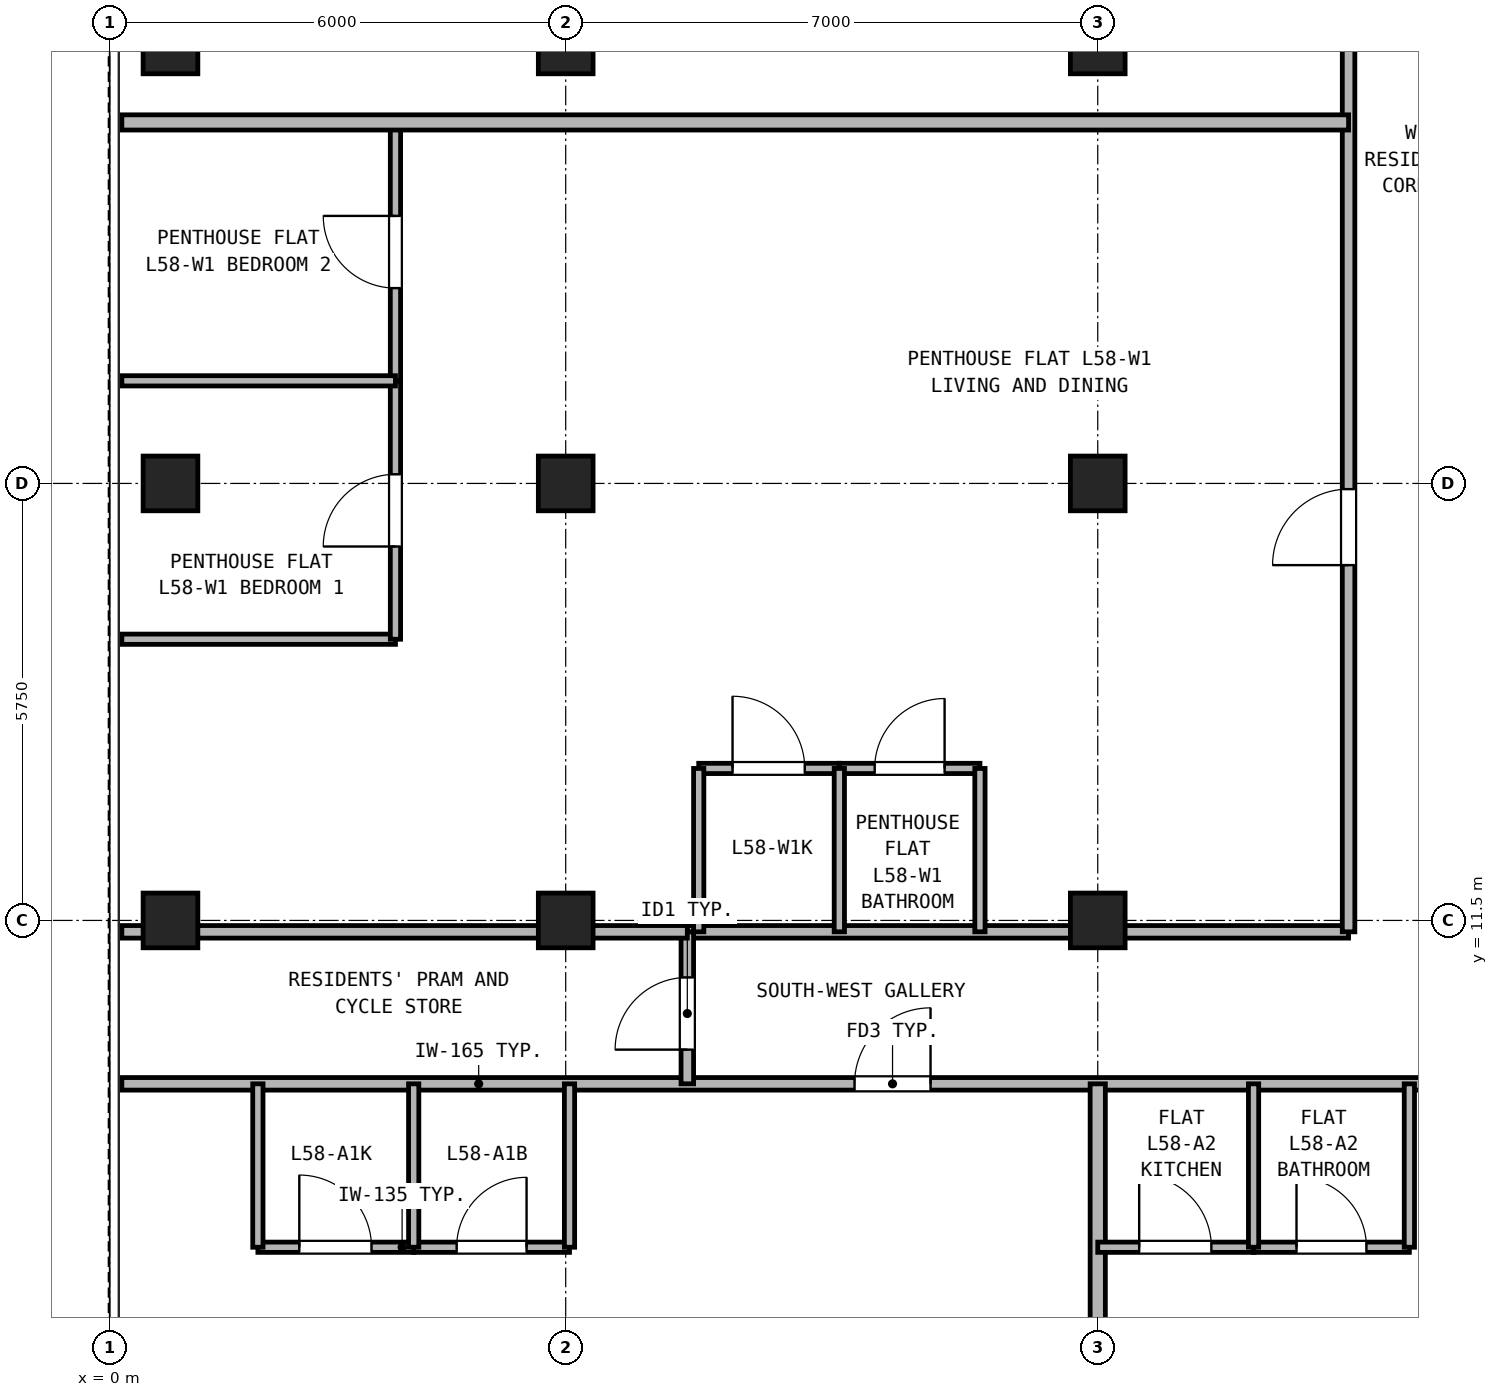
"""IFC4 building model, lengths in metres.
Left out: names, types, materials, properties, quantities, classifications, styles, units other than length and angle.
Written with IfcOpenShell. Run it as: python <this file> out.ifc"""

import sys

from ifc_helpers import new_model, si_unit, direction, frame, frame_2d, origin, origin_2d, place, context, subcontext, project, spatial, rectangle, hollow_rectangle, extrude, source, transform, mapped, element, fill, save


model = new_model("IFC4")
c1 = context("Model", 3, precision=1e-05, world=origin(), true_north=direction((0.0, 1.0)))
c2 = subcontext(c1, "Body", "Model", "MODEL_VIEW")
j1 = project(units=[si_unit("LENGTHUNIT", "METRE"), si_unit("PLANEANGLEUNIT", "RADIAN")], contexts=[c1])
p1 = place(None, origin())
s1 = spatial("IfcSite", under=j1, at=p1, CompositionType="ELEMENT")
p2 = place(p1, origin())
s2 = spatial("IfcBuilding", under=s1, at=p2, CompositionType="ELEMENT")
p3 = place(p2, frame((0.0, 0.0, 206.0)))
s3 = spatial("IfcBuildingStorey", under=s2, at=p3, CompositionType="ELEMENT", Elevation=206.0)
m1 = source(origin(), c2, "Body", "SweptSolid", [
    extrude(hollow_rectangle(XDim=0.72, YDim=0.72, WallThickness=0.04, at=origin_2d()), origin(), (0.0, 0.0, 1.0), 2.95),
])
for number, where, z_axis, x_axis in (
    (1, (0.8, 11.5, 0.0), (0.0, 0.0, 1.0), (1.0, 0.0, 0.0)),
    (2, (0.8, 17.25, 0.0), (0.0, 0.0, 1.0), (1.0, 0.0, 0.0)),
    (3, (0.8, 23.0, 0.0), (0.0, 0.0, 1.0), (1.0, 0.0, 0.0)),
    (4, (6.0, 11.5, 0.0), (0.0, 0.0, 1.0), (1.0, 0.0, 0.0)),
    (5, (6.0, 17.25, 0.0), (0.0, 0.0, 1.0), (1.0, 0.0, 0.0)),
    (6, (6.0, 23.0, 0.0), (0.0, 0.0, 1.0), (1.0, 0.0, 0.0)),
    (7, (13.0, 11.5, 0.0), (0.0, 0.0, 1.0), (1.0, 0.0, 0.0)),
    (8, (13.0, 17.25, 0.0), (0.0, 0.0, 1.0), (1.0, 0.0, 0.0)),
    (9, (13.0, 23.0, 0.0), (0.0, 0.0, 1.0), (1.0, 0.0, 0.0)),
):
    element("IfcColumn", number, at=place(p3, frame(where, z_axis=z_axis, x_axis=x_axis)), inside=s3, PredefinedType="COLUMN", context=c2, shape_type="MappedRepresentation", body=[
        mapped(m1, transform((0.0, 0.0, 0.0), x_axis=(1.0, 0.0, 0.0), y_axis=(0.0, 1.0, 0.0), z_axis=(0.0, 0.0, 1.0), scale=1.0)),
    ])
p4 = place(p3, frame((0.16, 9.35, 0.0), z_axis=(0.0, 0.0, 1.0), x_axis=(1.0, 0.0, 0.0)))
e10 = element("IfcWall", 10, at=p4, inside=s3, PredefinedType="PARTITIONING", context=c2, shape_type="SweptSolid", body=[
    extrude(rectangle(XDim=41.48, YDim=0.165, at=frame_2d((20.74, 0.0))), origin(), (0.0, 0.0, 1.0), 2.95),
])
p5 = place(p4, frame((9.64, 0.0, 0.0)))
e11 = element("IfcOpeningElement", 11, at=p5, cuts=e10, PredefinedType="OPENING", context=c2, shape_type="SweptSolid", body=[
    extrude(rectangle(XDim=1.0, YDim=2.15, at=frame_2d((0.5, 1.075))), frame((0.0, 0.093, 0.0), z_axis=(0.0, -1.0, 0.0), x_axis=(1.0, 0.0, 0.0)), (0.0, 0.0, 1.0), 0.185),
])
p6 = place(p4, frame((19.09, 0.0, 0.0)))
e12 = element("IfcOpeningElement", 12, at=p6, cuts=e10, PredefinedType="OPENING", context=c2, shape_type="SweptSolid", body=[
    extrude(rectangle(XDim=1.0, YDim=2.15, at=frame_2d((0.5, 1.075))), frame((0.0, 0.093, 0.0), z_axis=(0.0, -1.0, 0.0), x_axis=(1.0, 0.0, 0.0)), (0.0, 0.0, 1.0), 0.185),
])
p7 = place(p4, frame((28.34, 0.0, 0.0)))
e13 = element("IfcOpeningElement", 13, at=p7, cuts=e10, PredefinedType="OPENING", context=c2, shape_type="SweptSolid", body=[
    extrude(rectangle(XDim=1.0, YDim=2.15, at=frame_2d((0.5, 1.075))), frame((0.0, 0.093, 0.0), z_axis=(0.0, -1.0, 0.0), x_axis=(1.0, 0.0, 0.0)), (0.0, 0.0, 1.0), 0.185),
])
p8 = place(p4, frame((32.865, 0.0, 0.0)))
e14 = element("IfcOpeningElement", 14, at=p8, cuts=e10, PredefinedType="OPENING", context=c2, shape_type="SweptSolid", body=[
    extrude(rectangle(XDim=1.0, YDim=2.15, at=frame_2d((0.5, 1.075))), frame((0.0, 0.093, 0.0), z_axis=(0.0, -1.0, 0.0), x_axis=(1.0, 0.0, 0.0)), (0.0, 0.0, 1.0), 0.185),
])
p9 = place(p3, frame((7.6, 11.35, 0.0), z_axis=(0.0, 0.0, 1.0), x_axis=(1.0, 0.0, 0.0)))
e15 = element("IfcWall", 15, at=p9, inside=s3, PredefinedType="PARTITIONING", context=c2, shape_type="SweptSolid", body=[
    extrude(rectangle(XDim=8.7, YDim=0.165, at=frame_2d((4.35, 0.0))), origin(), (0.0, 0.0, 1.0), 2.323),
])
p10 = place(p3, frame((7.6, 9.35, 0.0), z_axis=(0.0, 0.0, 1.0), x_axis=(0.0, 1.0, 0.0)))
e16 = element("IfcWall", 16, at=p10, inside=s3, PredefinedType="PARTITIONING", context=c2, shape_type="SweptSolid", body=[
    extrude(rectangle(XDim=2.0, YDim=0.165, at=frame_2d((1.0, 0.0))), origin(), (0.0, 0.0, 1.0), 2.95),
])
p11 = place(p10, frame((0.45, 0.0, 0.0)))
e17 = element("IfcOpeningElement", 17, at=p11, cuts=e16, PredefinedType="OPENING", context=c2, shape_type="SweptSolid", body=[
    extrude(rectangle(XDim=0.95, YDim=2.15, at=frame_2d((0.475, 1.075))), frame((0.0, 0.093, 0.0), z_axis=(0.0, -1.0, 0.0), x_axis=(1.0, 0.0, 0.0)), (0.0, 0.0, 1.0), 0.185),
])
p12 = place(p3, frame((16.3, 11.35, 0.0), z_axis=(0.0, 0.0, 1.0), x_axis=(0.0, 1.0, 0.0)))
e18 = element("IfcWall", 18, at=p12, inside=s3, PredefinedType="PARTITIONING", context=c2, shape_type="SweptSolid", body=[
    extrude(rectangle(XDim=23.79, YDim=0.165, at=frame_2d((11.895, 0.0))), origin(), (0.0, 0.0, 1.0), 2.95),
])
p13 = place(p12, frame((4.825, 0.0, 0.0)))
e19 = element("IfcOpeningElement", 19, at=p13, cuts=e18, PredefinedType="OPENING", context=c2, shape_type="SweptSolid", body=[
    extrude(rectangle(XDim=1.0, YDim=2.15, at=frame_2d((0.5, 1.075))), frame((0.0, 0.093, 0.0), z_axis=(0.0, -1.0, 0.0), x_axis=(1.0, 0.0, 0.0)), (0.0, 0.0, 1.0), 0.185),
])
p14 = place(p12, frame((14.475, 0.0, 0.0)))
e20 = element("IfcOpeningElement", 20, at=p14, cuts=e18, PredefinedType="OPENING", context=c2, shape_type="SweptSolid", body=[
    extrude(rectangle(XDim=1.0, YDim=2.15, at=frame_2d((0.5, 1.075))), frame((0.0, 0.093, 0.0), z_axis=(0.0, -1.0, 0.0), x_axis=(1.0, 0.0, 0.0)), (0.0, 0.0, 1.0), 0.185),
])
p15 = place(p3, frame((1.95, 7.2, 0.0), z_axis=(0.0, 0.0, 1.0), x_axis=(1.0, 0.0, 0.0)))
e21 = element("IfcWall", 21, at=p15, inside=s3, PredefinedType="PARTITIONING", context=c2, shape_type="SweptSolid", body=[
    extrude(rectangle(XDim=2.05, YDim=0.135, at=frame_2d((1.025, 0.0))), origin(), (0.0, 0.0, 1.0), 2.95),
])
p16 = place(p15, frame((0.545, 0.0, 0.0)))
e22 = element("IfcOpeningElement", 22, at=p16, cuts=e21, PredefinedType="OPENING", context=c2, shape_type="SweptSolid", body=[
    extrude(rectangle(XDim=0.95, YDim=2.15, at=frame_2d((0.475, 1.075))), frame((0.0, 0.077, 0.0), z_axis=(0.0, -1.0, 0.0), x_axis=(1.0, 0.0, 0.0)), (0.0, 0.0, 1.0), 0.155),
])
p17 = place(p3, frame((4.0, 7.2, 0.0), z_axis=(0.0, 0.0, 1.0), x_axis=(1.0, 0.0, 0.0)))
e23 = element("IfcWall", 23, at=p17, inside=s3, PredefinedType="PARTITIONING", context=c2, shape_type="SweptSolid", body=[
    extrude(rectangle(XDim=2.05, YDim=0.135, at=frame_2d((1.025, 0.0))), origin(), (0.0, 0.0, 1.0), 2.95),
])
p18 = place(p17, frame((0.565, 0.0, 0.0)))
e24 = element("IfcOpeningElement", 24, at=p18, cuts=e23, PredefinedType="OPENING", context=c2, shape_type="SweptSolid", body=[
    extrude(rectangle(XDim=0.92, YDim=2.1, at=frame_2d((0.46, 1.05))), frame((0.0, 0.077, 0.0), z_axis=(0.0, -1.0, 0.0), x_axis=(1.0, 0.0, 0.0)), (0.0, 0.0, 1.0), 0.155),
])
for number, where, z_axis, x_axis in (
    (25, (1.95, 7.2, 0.0), (0.0, 0.0, 1.0), (0.0, 1.0, 0.0)),
    (26, (4.0, 7.2, 0.0), (0.0, 0.0, 1.0), (0.0, 1.0, 0.0)),
):
    element("IfcWall", number, at=place(p3, frame(where, z_axis=z_axis, x_axis=x_axis)), inside=s3, PredefinedType="PARTITIONING", context=c2, shape_type="SweptSolid", body=[
        extrude(rectangle(XDim=2.15, YDim=0.135, at=frame_2d((1.075, 0.0))), origin(), (0.0, 0.0, 1.0), 2.95),
    ])
p19 = place(p3, frame((6.05, 7.2, 0.0), z_axis=(0.0, 0.0, 1.0), x_axis=(0.0, 1.0, 0.0)))
e27 = element("IfcWall", 27, at=p19, inside=s3, PredefinedType="PARTITIONING", context=c2, shape_type="SweptSolid", body=[
    extrude(rectangle(XDim=2.15, YDim=0.135, at=frame_2d((1.075, 0.0))), origin(), (0.0, 0.0, 1.0), 2.323),
])
p20 = place(p3, frame((13.0, 0.16, 0.0), z_axis=(0.0, 0.0, 1.0), x_axis=(0.0, 1.0, 0.0)))
e28 = element("IfcWall", 28, at=p20, inside=s3, PredefinedType="PARTITIONING", context=c2, shape_type="SweptSolid", body=[
    extrude(rectangle(XDim=9.19, YDim=0.2, at=frame_2d((4.595, 0.0))), origin(), (0.0, 0.0, 1.0), 2.323),
])
p21 = place(p3, frame((13.0, 7.2, 0.0), z_axis=(0.0, 0.0, 1.0), x_axis=(1.0, 0.0, 0.0)))
e29 = element("IfcWall", 29, at=p21, inside=s3, PredefinedType="PARTITIONING", context=c2, shape_type="SweptSolid", body=[
    extrude(rectangle(XDim=2.05, YDim=0.135, at=frame_2d((1.025, 0.0))), origin(), (0.0, 0.0, 1.0), 2.95),
])
p22 = place(p21, frame((0.545, 0.0, 0.0)))
e30 = element("IfcOpeningElement", 30, at=p22, cuts=e29, PredefinedType="OPENING", context=c2, shape_type="SweptSolid", body=[
    extrude(rectangle(XDim=0.95, YDim=2.15, at=frame_2d((0.475, 1.075))), frame((0.0, 0.077, 0.0), z_axis=(0.0, -1.0, 0.0), x_axis=(1.0, 0.0, 0.0)), (0.0, 0.0, 1.0), 0.155),
])
p23 = place(p3, frame((15.05, 7.2, 0.0), z_axis=(0.0, 0.0, 1.0), x_axis=(1.0, 0.0, 0.0)))
e31 = element("IfcWall", 31, at=p23, inside=s3, PredefinedType="PARTITIONING", context=c2, shape_type="SweptSolid", body=[
    extrude(rectangle(XDim=2.05, YDim=0.135, at=frame_2d((1.025, 0.0))), origin(), (0.0, 0.0, 1.0), 2.95),
])
p24 = place(p23, frame((0.565, 0.0, 0.0)))
e32 = element("IfcOpeningElement", 32, at=p24, cuts=e31, PredefinedType="OPENING", context=c2, shape_type="SweptSolid", body=[
    extrude(rectangle(XDim=0.92, YDim=2.1, at=frame_2d((0.46, 1.05))), frame((0.0, 0.077, 0.0), z_axis=(0.0, -1.0, 0.0), x_axis=(1.0, 0.0, 0.0)), (0.0, 0.0, 1.0), 0.155),
])
for number, where, z_axis, x_axis in (
    (33, (15.05, 7.2, 0.0), (0.0, 0.0, 1.0), (0.0, 1.0, 0.0)),
    (34, (17.1, 7.2, 0.0), (0.0, 0.0, 1.0), (0.0, 1.0, 0.0)),
):
    element("IfcWall", number, at=place(p3, frame(where, z_axis=z_axis, x_axis=x_axis)), inside=s3, PredefinedType="PARTITIONING", context=c2, shape_type="SweptSolid", body=[
        extrude(rectangle(XDim=2.15, YDim=0.135, at=frame_2d((1.075, 0.0))), origin(), (0.0, 0.0, 1.0), 2.95),
    ])
p25 = place(p3, frame((0.16, 11.35, 0.0), z_axis=(0.0, 0.0, 1.0), x_axis=(1.0, 0.0, 0.0)))
e35 = element("IfcWall", 35, at=p25, inside=s3, PredefinedType="PARTITIONING", context=c2, shape_type="SweptSolid", body=[
    extrude(rectangle(XDim=7.44, YDim=0.165, at=frame_2d((3.72, 0.0))), origin(), (0.0, 0.0, 1.0), 2.323),
])
p26 = place(p3, frame((7.75, 13.5, 0.0), z_axis=(0.0, 0.0, 1.0), x_axis=(1.0, 0.0, 0.0)))
e36 = element("IfcWall", 36, at=p26, inside=s3, PredefinedType="PARTITIONING", context=c2, shape_type="SweptSolid", body=[
    extrude(rectangle(XDim=1.85, YDim=0.135, at=frame_2d((0.925, 0.0))), origin(), (0.0, 0.0, 1.0), 2.95),
])
p27 = place(p26, frame((0.445, 0.0, 0.0)))
e37 = element("IfcOpeningElement", 37, at=p27, cuts=e36, PredefinedType="OPENING", context=c2, shape_type="SweptSolid", body=[
    extrude(rectangle(XDim=0.95, YDim=2.15, at=frame_2d((0.475, 1.075))), frame((0.0, 0.077, 0.0), z_axis=(0.0, -1.0, 0.0), x_axis=(1.0, 0.0, 0.0)), (0.0, 0.0, 1.0), 0.155),
])
p28 = place(p3, frame((9.6, 13.5, 0.0), z_axis=(0.0, 0.0, 1.0), x_axis=(1.0, 0.0, 0.0)))
e38 = element("IfcWall", 38, at=p28, inside=s3, PredefinedType="PARTITIONING", context=c2, shape_type="SweptSolid", body=[
    extrude(rectangle(XDim=1.85, YDim=0.135, at=frame_2d((0.925, 0.0))), origin(), (0.0, 0.0, 1.0), 2.95),
])
p29 = place(p28, frame((0.465, 0.0, 0.0)))
e39 = element("IfcOpeningElement", 39, at=p29, cuts=e38, PredefinedType="OPENING", context=c2, shape_type="SweptSolid", body=[
    extrude(rectangle(XDim=0.92, YDim=2.1, at=frame_2d((0.46, 1.05))), frame((0.0, 0.077, 0.0), z_axis=(0.0, -1.0, 0.0), x_axis=(1.0, 0.0, 0.0)), (0.0, 0.0, 1.0), 0.155),
])
for number, where, z_axis, x_axis in (
    (40, (7.75, 11.35, 0.0), (0.0, 0.0, 1.0), (0.0, 1.0, 0.0)),
    (41, (9.6, 11.35, 0.0), (0.0, 0.0, 1.0), (0.0, 1.0, 0.0)),
    (42, (11.45, 11.35, 0.0), (0.0, 0.0, 1.0), (0.0, 1.0, 0.0)),
):
    element("IfcWall", number, at=place(p3, frame(where, z_axis=z_axis, x_axis=x_axis)), inside=s3, PredefinedType="PARTITIONING", context=c2, shape_type="SweptSolid", body=[
        extrude(rectangle(XDim=2.15, YDim=0.135, at=frame_2d((1.075, 0.0))), origin(), (0.0, 0.0, 1.0), 2.95),
    ])
p30 = place(p3, frame((0.16, 15.2, 0.0), z_axis=(0.0, 0.0, 1.0), x_axis=(1.0, 0.0, 0.0)))
e43 = element("IfcWall", 43, at=p30, inside=s3, PredefinedType="PARTITIONING", context=c2, shape_type="SweptSolid", body=[
    extrude(rectangle(XDim=3.6, YDim=0.135, at=frame_2d((1.8, 0.0))), origin(), (0.0, 0.0, 1.0), 2.95),
])
p31 = place(p3, frame((3.76, 15.2, 0.0), z_axis=(0.0, 0.0, 1.0), x_axis=(0.0, 1.0, 0.0)))
e44 = element("IfcWall", 44, at=p31, inside=s3, PredefinedType="PARTITIONING", context=c2, shape_type="SweptSolid", body=[
    extrude(rectangle(XDim=3.4, YDim=0.135, at=frame_2d((1.7, 0.0))), origin(), (0.0, 0.0, 1.0), 2.95),
])
p32 = place(p31, frame((1.22, 0.0, 0.0)))
e45 = element("IfcOpeningElement", 45, at=p32, cuts=e44, PredefinedType="OPENING", context=c2, shape_type="SweptSolid", body=[
    extrude(rectangle(XDim=0.95, YDim=2.15, at=frame_2d((0.475, 1.075))), frame((0.0, 0.077, 0.0), z_axis=(0.0, -1.0, 0.0), x_axis=(1.0, 0.0, 0.0)), (0.0, 0.0, 1.0), 0.155),
])
p33 = place(p3, frame((3.76, 18.6, 0.0), z_axis=(0.0, 0.0, 1.0), x_axis=(0.0, 1.0, 0.0)))
e46 = element("IfcWall", 46, at=p33, inside=s3, PredefinedType="PARTITIONING", context=c2, shape_type="SweptSolid", body=[
    extrude(rectangle(XDim=3.4, YDim=0.135, at=frame_2d((1.7, 0.0))), origin(), (0.0, 0.0, 1.0), 2.95),
])
p34 = place(p33, frame((1.22, 0.0, 0.0)))
e47 = element("IfcOpeningElement", 47, at=p34, cuts=e46, PredefinedType="OPENING", context=c2, shape_type="SweptSolid", body=[
    extrude(rectangle(XDim=0.95, YDim=2.15, at=frame_2d((0.475, 1.075))), frame((0.0, 0.077, 0.0), z_axis=(0.0, -1.0, 0.0), x_axis=(1.0, 0.0, 0.0)), (0.0, 0.0, 1.0), 0.155),
])
p35 = place(p3, frame((0.16, 18.6, 0.0), z_axis=(0.0, 0.0, 1.0), x_axis=(1.0, 0.0, 0.0)))
e48 = element("IfcWall", 48, at=p35, inside=s3, PredefinedType="PARTITIONING", context=c2, shape_type="SweptSolid", body=[
    extrude(rectangle(XDim=3.6, YDim=0.135, at=frame_2d((1.8, 0.0))), origin(), (0.0, 0.0, 1.0), 2.95),
])
p36 = place(p3, frame((0.16, 22.0, 0.0), z_axis=(0.0, 0.0, 1.0), x_axis=(1.0, 0.0, 0.0)))
e49 = element("IfcWall", 49, at=p36, inside=s3, PredefinedType="PARTITIONING", context=c2, shape_type="SweptSolid", body=[
    extrude(rectangle(XDim=16.14, YDim=0.2, at=frame_2d((8.07, 0.0))), origin(), (0.0, 0.0, 1.0), 2.95),
])
p37 = place(p16, origin())
e50 = element("IfcDoor", 50, at=p37, inside=s3, OperationType="SINGLE_SWING_LEFT", PredefinedType="DOOR", context=c2, shape_type="SweptSolid", body=[
    extrude(rectangle(XDim=0.95, YDim=2.15, at=frame_2d((0.475, 1.075))), frame((0.0, 0.025, 0.0), z_axis=(0.0, -1.0, 0.0), x_axis=(1.0, 0.0, 0.0)), (0.0, 0.0, 1.0), 0.05),
])
fill(e22, e50)
p38 = place(p18, origin())
e51 = element("IfcDoor", 51, at=p38, inside=s3, OperationType="SINGLE_SWING_RIGHT", PredefinedType="DOOR", context=c2, shape_type="SweptSolid", body=[
    extrude(rectangle(XDim=0.92, YDim=2.1, at=frame_2d((0.46, 1.05))), frame((0.0, 0.025, 0.0), z_axis=(0.0, -1.0, 0.0), x_axis=(1.0, 0.0, 0.0)), (0.0, 0.0, 1.0), 0.05),
])
fill(e24, e51)
p39 = place(p5, frame((1.0, 0.0, 0.0), z_axis=(0.0, 0.0, 1.0), x_axis=(-1.0, 0.0, 0.0)))
e52 = element("IfcDoor", 52, at=p39, inside=s3, OperationType="SINGLE_SWING_RIGHT", PredefinedType="DOOR", context=c2, shape_type="SweptSolid", body=[
    extrude(rectangle(XDim=1.0, YDim=2.15, at=frame_2d((0.5, 1.075))), frame((0.0, 0.025, 0.0), z_axis=(0.0, -1.0, 0.0), x_axis=(1.0, 0.0, 0.0)), (0.0, 0.0, 1.0), 0.05),
])
fill(e11, e52)
p40 = place(p22, origin())
e53 = element("IfcDoor", 53, at=p40, inside=s3, OperationType="SINGLE_SWING_LEFT", PredefinedType="DOOR", context=c2, shape_type="SweptSolid", body=[
    extrude(rectangle(XDim=0.95, YDim=2.15, at=frame_2d((0.475, 1.075))), frame((0.0, 0.025, 0.0), z_axis=(0.0, -1.0, 0.0), x_axis=(1.0, 0.0, 0.0)), (0.0, 0.0, 1.0), 0.05),
])
fill(e30, e53)
p41 = place(p24, origin())
e54 = element("IfcDoor", 54, at=p41, inside=s3, OperationType="SINGLE_SWING_LEFT", PredefinedType="DOOR", context=c2, shape_type="SweptSolid", body=[
    extrude(rectangle(XDim=0.92, YDim=2.1, at=frame_2d((0.46, 1.05))), frame((0.0, 0.025, 0.0), z_axis=(0.0, -1.0, 0.0), x_axis=(1.0, 0.0, 0.0)), (0.0, 0.0, 1.0), 0.05),
])
fill(e32, e54)
p42 = place(p11, frame((0.95, 0.0, 0.0), z_axis=(0.0, 0.0, 1.0), x_axis=(-1.0, 0.0, 0.0)))
e55 = element("IfcDoor", 55, at=p42, inside=s3, OperationType="SINGLE_SWING_LEFT", PredefinedType="DOOR", context=c2, shape_type="SweptSolid", body=[
    extrude(rectangle(XDim=0.95, YDim=2.15, at=frame_2d((0.475, 1.075))), frame((0.0, 0.025, 0.0), z_axis=(0.0, -1.0, 0.0), x_axis=(1.0, 0.0, 0.0)), (0.0, 0.0, 1.0), 0.05),
])
fill(e17, e55)
p43 = place(p27, origin())
e56 = element("IfcDoor", 56, at=p43, inside=s3, OperationType="SINGLE_SWING_LEFT", PredefinedType="DOOR", context=c2, shape_type="SweptSolid", body=[
    extrude(rectangle(XDim=0.95, YDim=2.15, at=frame_2d((0.475, 1.075))), frame((0.0, 0.025, 0.0), z_axis=(0.0, -1.0, 0.0), x_axis=(1.0, 0.0, 0.0)), (0.0, 0.0, 1.0), 0.05),
])
fill(e37, e56)
p44 = place(p29, origin())
e57 = element("IfcDoor", 57, at=p44, inside=s3, OperationType="SINGLE_SWING_RIGHT", PredefinedType="DOOR", context=c2, shape_type="SweptSolid", body=[
    extrude(rectangle(XDim=0.92, YDim=2.1, at=frame_2d((0.46, 1.05))), frame((0.0, 0.025, 0.0), z_axis=(0.0, -1.0, 0.0), x_axis=(1.0, 0.0, 0.0)), (0.0, 0.0, 1.0), 0.05),
])
fill(e39, e57)
p45 = place(p32, origin())
e58 = element("IfcDoor", 58, at=p45, inside=s3, OperationType="SINGLE_SWING_LEFT", PredefinedType="DOOR", context=c2, shape_type="SweptSolid", body=[
    extrude(rectangle(XDim=0.95, YDim=2.15, at=frame_2d((0.475, 1.075))), frame((0.0, 0.025, 0.0), z_axis=(0.0, -1.0, 0.0), x_axis=(1.0, 0.0, 0.0)), (0.0, 0.0, 1.0), 0.05),
])
fill(e45, e58)
p46 = place(p34, origin())
e59 = element("IfcDoor", 59, at=p46, inside=s3, OperationType="SINGLE_SWING_RIGHT", PredefinedType="DOOR", context=c2, shape_type="SweptSolid", body=[
    extrude(rectangle(XDim=0.95, YDim=2.15, at=frame_2d((0.475, 1.075))), frame((0.0, 0.025, 0.0), z_axis=(0.0, -1.0, 0.0), x_axis=(1.0, 0.0, 0.0)), (0.0, 0.0, 1.0), 0.05),
])
fill(e47, e59)
p47 = place(p13, origin())
e60 = element("IfcDoor", 60, at=p47, inside=s3, OperationType="SINGLE_SWING_LEFT", PredefinedType="DOOR", context=c2, shape_type="SweptSolid", body=[
    extrude(rectangle(XDim=1.0, YDim=2.15, at=frame_2d((0.5, 1.075))), frame((0.0, 0.025, 0.0), z_axis=(0.0, -1.0, 0.0), x_axis=(1.0, 0.0, 0.0)), (0.0, 0.0, 1.0), 0.05),
])
fill(e19, e60)
save(model, sys.argv[1])
